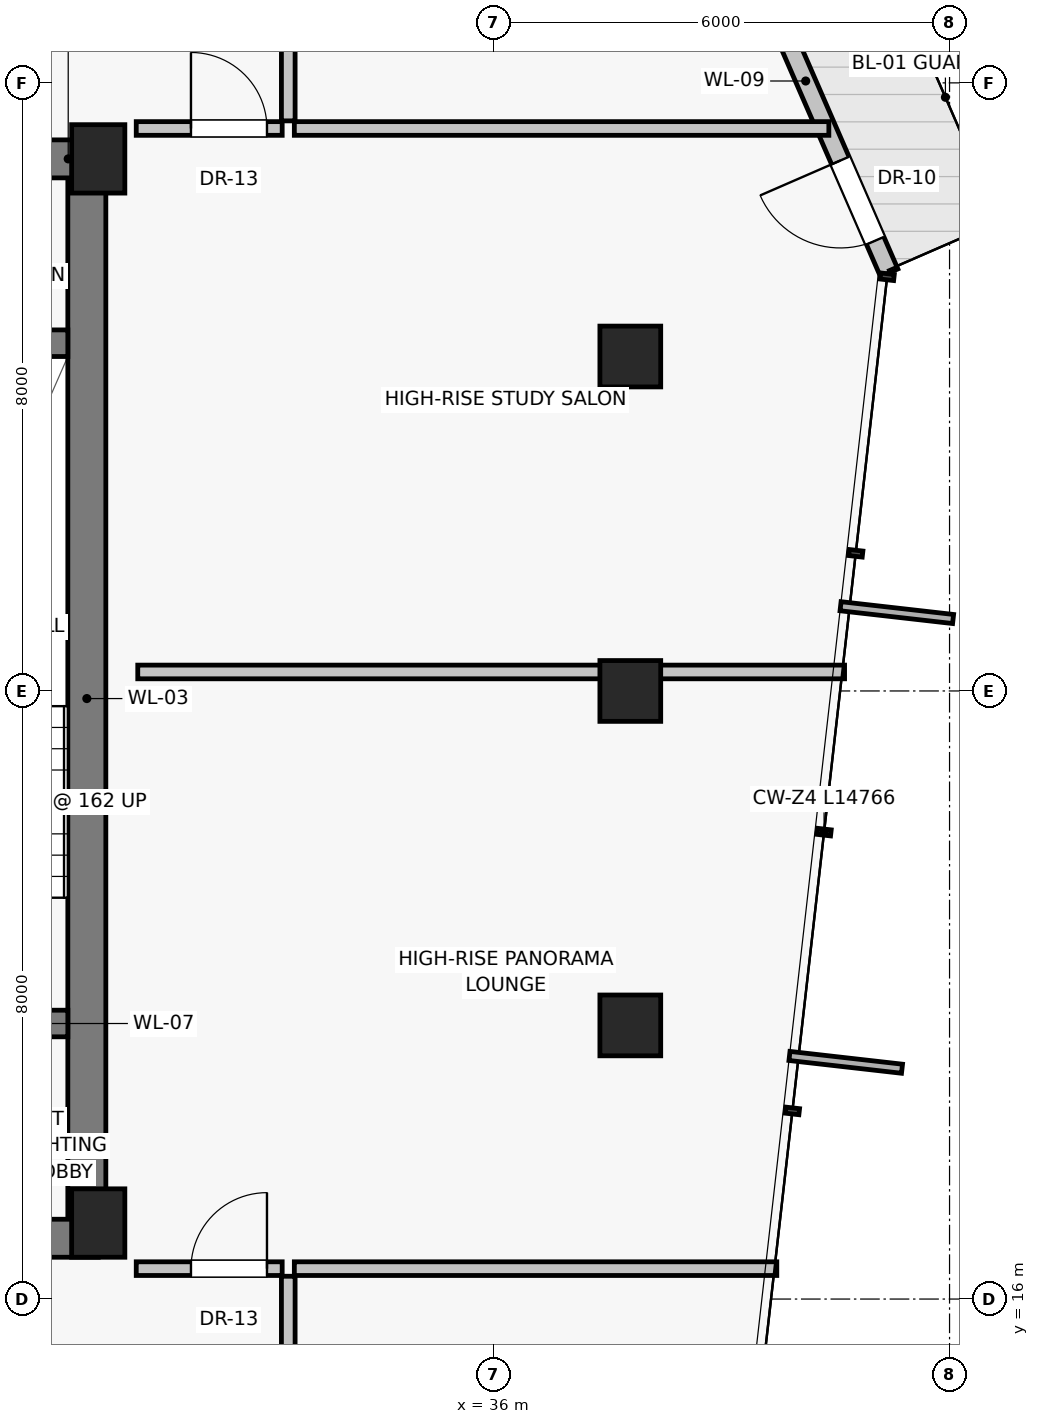
"""IFC4 building model, lengths in metres.
Left out: names, types, materials, properties, quantities, classifications, styles, units other than length and angle.
Written with IfcOpenShell. Run it as: python <this file> out.ifc"""

import sys

from ifc_helpers import new_model, si_unit, direction, frame, frame_2d, origin, origin_2d, place, context, subcontext, project, spatial, rectangle, extrude, source, transform, mapped, element, fill, save


model = new_model("IFC4")
c1 = context("Model", 3, precision=1e-05, world=origin(), true_north=direction((0.0, 1.0)))
c2 = subcontext(c1, "Body", "Model", "MODEL_VIEW")
j1 = project(units=[si_unit("LENGTHUNIT", "METRE"), si_unit("PLANEANGLEUNIT", "RADIAN")], contexts=[c1])
p1 = place(None, origin())
s1 = spatial("IfcSite", under=j1, at=p1, CompositionType="ELEMENT")
p2 = place(p1, origin())
s2 = spatial("IfcBuilding", under=s1, at=p2, CompositionType="ELEMENT")
p3 = place(p2, frame((0.0, 0.0, 230.05)))
s3 = spatial("IfcBuildingStorey", under=s2, at=p3, CompositionType="ELEMENT", Elevation=230.05)
for number, where, z_axis, x_axis in (
    (1, (30.8, 17.0, 0.0), (0.0, 0.0, 1.0), (1.0, 0.0, 0.0)),
    (2, (30.8, 31.0, 0.0), (0.0, 0.0, 1.0), (1.0, 0.0, 0.0)),
):
    element("IfcColumn", number, at=place(p3, frame(where, z_axis=z_axis, x_axis=x_axis)), inside=s3, PredefinedType="PILASTER", context=c2, shape_type="SweptSolid", body=[
        extrude(rectangle(XDim=0.7, YDim=0.9, at=origin_2d()), origin(), (0.0, 0.0, 1.0), 3.25),
    ])
for number, where, z_axis, x_axis in (
    (3, (37.8, 19.6, -0.235), (0.0, 0.0, 1.0), (1.0, 0.0, 0.0)),
    (4, (37.8, 24.0, -0.235), (0.0, 0.0, 1.0), (1.0, 0.0, 0.0)),
    (5, (37.8, 28.4, -0.235), (0.0, 0.0, 1.0), (1.0, 0.0, 0.0)),
):
    element("IfcColumn", number, at=place(p3, frame(where, z_axis=z_axis, x_axis=x_axis)), inside=s3, PredefinedType="COLUMN", context=c2, shape_type="SweptSolid", body=[
        extrude(rectangle(XDim=0.8, YDim=0.8, at=origin_2d()), origin(), (0.0, 0.0, 1.0), 3.485),
    ])
p4 = place(p3, frame((41.205, 29.502, 0.0), z_axis=(0.0, 0.0, 1.0), x_axis=(-0.399074107553, 0.916918675064, 0.0)))
e6 = element("IfcWall", 6, at=p4, inside=s3, PredefinedType="SOLIDWALL", context=c2, shape_type="SweptSolid", body=[
    extrude(rectangle(XDim=3.643, YDim=0.25, at=frame_2d((1.821, 0.0))), origin(), (0.0, 0.0, 1.0), 3.015),
])
p5 = place(p4, frame((0.46, 0.0, 0.0)))
e7 = element("IfcOpeningElement", 7, at=p5, cuts=e6, PredefinedType="OPENING", context=c2, shape_type="SweptSolid", body=[
    extrude(rectangle(XDim=1.15, YDim=2.25, at=frame_2d((0.575, 1.125))), frame((0.0, 0.135, 0.0), z_axis=(0.0, -1.0, 0.0), x_axis=(1.0, 0.0, 0.0)), (0.0, 0.0, 1.0), 0.27),
])
p6 = place(p3, frame((30.65, 16.8, 0.0), z_axis=(0.0, 0.0, 1.0), x_axis=(0.0, 1.0, 0.0)))
e8 = element("IfcWall", 8, at=p6, inside=s3, PredefinedType="SHEAR", context=c2, shape_type="SweptSolid", body=[
    extrude(rectangle(XDim=14.2, YDim=0.5, at=frame_2d((7.1, 0.0))), origin(), (0.0, 0.0, 1.0), 3.015),
])
p7 = place(p3, frame((24.95, 16.8, 0.0), z_axis=(0.0, 0.0, 1.0), x_axis=(1.0, 0.0, 0.0)))
e9 = element("IfcWall", 9, at=p7, inside=s3, PredefinedType="SHEAR", context=c2, shape_type="SweptSolid", body=[
    extrude(rectangle(XDim=5.85, YDim=0.5, at=frame_2d((2.925, 0.0))), origin(), (0.0, 0.0, 1.0), 3.015),
])
p8 = place(p7, frame((2.15, 0.0, 0.0)))
e10 = element("IfcOpeningElement", 10, at=p8, cuts=e9, PredefinedType="OPENING", context=c2, shape_type="SweptSolid", body=[
    extrude(rectangle(XDim=1.2, YDim=2.03, at=frame_2d((0.6, 1.015))), frame((0.0, 0.26, 0.0), z_axis=(0.0, -1.0, 0.0), x_axis=(1.0, 0.0, 0.0)), (0.0, 0.0, 1.0), 0.52),
])
p9 = place(p3, frame((27.0, 31.0, 0.0), z_axis=(0.0, 0.0, 1.0), x_axis=(1.0, 0.0, 0.0)))
e11 = element("IfcWall", 11, at=p9, inside=s3, PredefinedType="SHEAR", context=c2, shape_type="SweptSolid", body=[
    extrude(rectangle(XDim=3.8, YDim=0.5, at=frame_2d((1.9, 0.0))), origin(), (0.0, 0.0, 1.0), 3.015),
])
p10 = place(p9, frame((0.45, 0.0, 0.0)))
e12 = element("IfcOpeningElement", 12, at=p10, cuts=e11, PredefinedType="OPENING", context=c2, shape_type="SweptSolid", body=[
    extrude(rectangle(XDim=0.86, YDim=2.01, at=frame_2d((0.43, 1.005))), frame((0.0, 0.26, 0.0), z_axis=(0.0, -1.0, 0.0), x_axis=(1.0, 0.0, 0.0)), (0.0, 0.0, 1.0), 0.52),
])
p11 = place(p9, frame((1.9, 0.0, 0.0)))
e13 = element("IfcOpeningElement", 13, at=p11, cuts=e11, PredefinedType="OPENING", context=c2, shape_type="SweptSolid", body=[
    extrude(rectangle(XDim=0.86, YDim=2.01, at=frame_2d((0.43, 1.005))), frame((0.0, 0.26, 0.0), z_axis=(0.0, -1.0, 0.0), x_axis=(1.0, 0.0, 0.0)), (0.0, 0.0, 1.0), 0.52),
])
p12 = place(p3, frame((27.025, 19.625, 0.0), z_axis=(0.0, 0.0, 1.0), x_axis=(1.0, 0.0, 0.0)))
e14 = element("IfcWall", 14, at=p12, inside=s3, PredefinedType="SHEAR", context=c2, shape_type="SweptSolid", body=[
    extrude(rectangle(XDim=3.375, YDim=0.35, at=frame_2d((1.688, 0.0))), origin(), (0.0, 0.0, 1.0), 3.015),
])
p13 = place(p12, frame((1.05, 0.0, 0.0)))
e15 = element("IfcOpeningElement", 15, at=p13, cuts=e14, PredefinedType="OPENING", context=c2, shape_type="SweptSolid", body=[
    extrude(rectangle(XDim=1.1, YDim=2.03, at=frame_2d((0.55, 1.015))), frame((0.0, 0.185, 0.0), z_axis=(0.0, -1.0, 0.0), x_axis=(1.0, 0.0, 0.0)), (0.0, 0.0, 1.0), 0.37),
])
p14 = place(p3, frame((27.025, 28.575, 0.0), z_axis=(0.0, 0.0, 1.0), x_axis=(1.0, 0.0, 0.0)))
e16 = element("IfcWall", 16, at=p14, inside=s3, PredefinedType="SHEAR", context=c2, shape_type="SweptSolid", body=[
    extrude(rectangle(XDim=3.375, YDim=0.35, at=frame_2d((1.688, 0.0))), origin(), (0.0, 0.0, 1.0), 3.015),
])
p15 = place(p3, frame((31.32, 24.25, 0.0), z_axis=(0.0, 0.0, 1.0), x_axis=(1.0, 0.0, 0.0)))
e17 = element("IfcWall", 17, at=p15, inside=s3, PredefinedType="PARTITIONING", context=c2, shape_type="SweptSolid", body=[
    extrude(rectangle(XDim=9.299, YDim=0.18, at=frame_2d((4.649, 0.0))), origin(), (0.0, 0.0, 1.0), 3.015),
])
p16 = place(p3, frame((33.3, 14.4, 0.0), z_axis=(0.0, 0.0, 1.0), x_axis=(0.0, 1.0, 0.0)))
e18 = element("IfcWall", 18, at=p16, inside=s3, PredefinedType="PARTITIONING", context=c2, shape_type="SweptSolid", body=[
    extrude(rectangle(XDim=1.9, YDim=0.18, at=frame_2d((0.95, 0.0))), origin(), (0.0, 0.0, 1.0), 3.015),
])
p17 = place(p3, frame((33.3, 31.5, 0.0), z_axis=(0.0, 0.0, 1.0), x_axis=(0.0, 1.0, 0.0)))
e19 = element("IfcWall", 19, at=p17, inside=s3, PredefinedType="PARTITIONING", context=c2, shape_type="SweptSolid", body=[
    extrude(rectangle(XDim=1.9, YDim=0.18, at=frame_2d((0.95, 0.0))), origin(), (0.0, 0.0, 1.0), 3.015),
])
p18 = place(p3, frame((31.3, 16.4, 0.0), z_axis=(0.0, 0.0, 1.0), x_axis=(1.0, 0.0, 0.0)))
e20 = element("IfcWall", 20, at=p18, inside=s3, PredefinedType="PARTITIONING", context=c2, shape_type="SweptSolid", body=[
    extrude(rectangle(XDim=1.92, YDim=0.18, at=frame_2d((0.96, 0.0))), origin(), (0.0, 0.0, 1.0), 3.015),
])
p19 = place(p18, frame((0.72, 0.0, 0.0)))
e21 = element("IfcOpeningElement", 21, at=p19, cuts=e20, PredefinedType="OPENING", context=c2, shape_type="SweptSolid", body=[
    extrude(rectangle(XDim=1.0, YDim=2.01, at=frame_2d((0.5, 1.005))), frame((0.0, 0.1, 0.0), z_axis=(0.0, -1.0, 0.0), x_axis=(1.0, 0.0, 0.0)), (0.0, 0.0, 1.0), 0.2),
])
p20 = place(p3, frame((33.38, 16.4, 0.0), z_axis=(0.0, 0.0, 1.0), x_axis=(1.0, 0.0, 0.0)))
e22 = element("IfcWall", 22, at=p20, inside=s3, PredefinedType="PARTITIONING", context=c2, shape_type="SweptSolid", body=[
    extrude(rectangle(XDim=6.347, YDim=0.18, at=frame_2d((3.174, 0.0))), origin(), (0.0, 0.0, 1.0), 3.015),
])
p21 = place(p3, frame((31.3, 31.4, 0.0), z_axis=(0.0, 0.0, 1.0), x_axis=(1.0, 0.0, 0.0)))
e23 = element("IfcWall", 23, at=p21, inside=s3, PredefinedType="PARTITIONING", context=c2, shape_type="SweptSolid", body=[
    extrude(rectangle(XDim=1.92, YDim=0.18, at=frame_2d((0.96, 0.0))), origin(), (0.0, 0.0, 1.0), 3.015),
])
p22 = place(p21, frame((0.72, 0.0, 0.0)))
e24 = element("IfcOpeningElement", 24, at=p22, cuts=e23, PredefinedType="OPENING", context=c2, shape_type="SweptSolid", body=[
    extrude(rectangle(XDim=1.0, YDim=2.01, at=frame_2d((0.5, 1.005))), frame((0.0, 0.1, 0.0), z_axis=(0.0, -1.0, 0.0), x_axis=(1.0, 0.0, 0.0)), (0.0, 0.0, 1.0), 0.2),
])
p23 = place(p3, frame((33.38, 31.4, 0.0), z_axis=(0.0, 0.0, 1.0), x_axis=(1.0, 0.0, 0.0)))
e25 = element("IfcWall", 25, at=p23, inside=s3, PredefinedType="PARTITIONING", context=c2, shape_type="SweptSolid", body=[
    extrude(rectangle(XDim=7.032, YDim=0.18, at=frame_2d((3.516, 0.0))), origin(), (0.0, 0.0, 1.0), 3.015),
])
m1 = source(origin(), c2, "Body", "SweptSolid", [
    extrude(rectangle(XDim=1.15, YDim=2.25, at=frame_2d((0.575, 1.125))), frame((0.0, 0.025, 0.0), z_axis=(0.0, -1.0, 0.0), x_axis=(1.0, 0.0, 0.0)), (0.0, 0.0, 1.0), 0.05),
])
p24 = place(p5, frame((1.15, 0.0, 0.0), z_axis=(0.0, 0.0, 1.0), x_axis=(-1.0, 0.0, 0.0)))
e26 = element("IfcDoor", 26, at=p24, inside=s3, OperationType="SINGLE_SWING_RIGHT", PredefinedType="DOOR", context=c2, shape_type="MappedRepresentation", body=[
    mapped(m1, transform((0.0, 0.0, 0.0), scale=1.0)),
])
fill(e7, e26)
m2 = source(origin(), c2, "Body", "SweptSolid", [
    extrude(rectangle(XDim=1.0, YDim=2.01, at=frame_2d((0.5, 1.005))), frame((0.0, 0.025, 0.0), z_axis=(0.0, -1.0, 0.0), x_axis=(1.0, 0.0, 0.0)), (0.0, 0.0, 1.0), 0.05),
])
p25 = place(p19, origin())
e27 = element("IfcDoor", 27, at=p25, inside=s3, OperationType="SINGLE_SWING_RIGHT", PredefinedType="DOOR", context=c2, shape_type="MappedRepresentation", body=[
    mapped(m2, transform((0.0, 0.0, 0.0), scale=1.0)),
])
fill(e21, e27)
p26 = place(p22, origin())
e28 = element("IfcDoor", 28, at=p26, inside=s3, OperationType="SINGLE_SWING_LEFT", PredefinedType="DOOR", context=c2, shape_type="MappedRepresentation", body=[
    mapped(m2, transform((0.0, 0.0, 0.0), scale=1.0)),
])
fill(e24, e28)
save(model, sys.argv[1])
